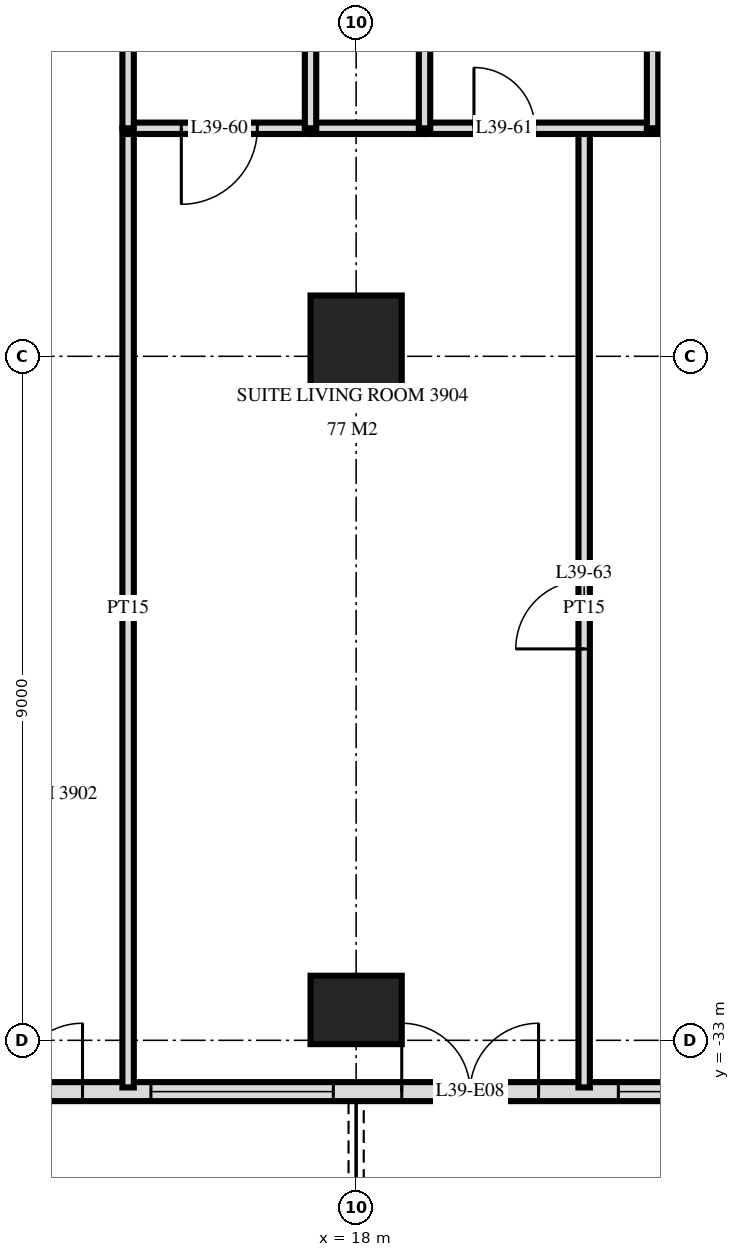
"""IFC4 building model, lengths in metres.
Left out: names, types, materials, properties, quantities, classifications, styles, units other than length and angle.
Written with IfcOpenShell. Run it as: python <this file> out.ifc"""

import sys

from ifc_helpers import new_model, si_unit, direction, frame, frame_2d, origin, origin_2d, place, context, subcontext, project, spatial, rectangle, extrude, element, fill, save


model = new_model("IFC4")
c1 = context("Model", 3, precision=1e-05, world=origin(), true_north=direction((0.0, 1.0)))
c2 = subcontext(c1, "Body", "Model", "MODEL_VIEW")
j1 = project(units=[si_unit("LENGTHUNIT", "METRE"), si_unit("PLANEANGLEUNIT", "RADIAN")], contexts=[c1])
p1 = place(None, origin())
s1 = spatial("IfcSite", under=j1, at=p1, CompositionType="ELEMENT")
p2 = place(p1, origin())
s2 = spatial("IfcBuilding", under=s1, at=p2, CompositionType="ELEMENT")
p3 = place(p2, frame((0.0, 0.0, 152.4)))
s3 = spatial("IfcBuildingStorey", under=s2, at=p3, CompositionType="ELEMENT", Elevation=152.4)
p4 = place(p3, frame((18.0, -32.6, 0.0), z_axis=(0.0, 0.0, 1.0), x_axis=(1.0, 0.0, 0.0)))
e1 = element("IfcColumn", 1, at=p4, inside=s3, PredefinedType="COLUMN", context=c2, shape_type="SweptSolid", body=[
    extrude(rectangle(XDim=1.2, YDim=0.9, at=origin_2d()), origin(), (0.0, 0.0, 1.0), 3.6),
])
p5 = place(p3, frame((18.0, -23.8, 0.0), z_axis=(0.0, 0.0, 1.0), x_axis=(1.0, 0.0, 0.0)))
e2 = element("IfcColumn", 2, at=p5, inside=s3, PredefinedType="COLUMN", context=c2, shape_type="SweptSolid", body=[
    extrude(rectangle(XDim=1.2, YDim=1.2, at=origin_2d()), origin(), (0.0, 0.0, 1.0), 3.6),
])
p6 = place(p3, frame((-23.675, -33.675, 0.0), z_axis=(0.0, 0.0, 1.0), x_axis=(1.0, 0.0, 0.0)))
e3 = element("IfcWall", 3, at=p6, inside=s3, PredefinedType="SOLIDWALL", context=c2, shape_type="SweptSolid", body=[
    extrude(rectangle(XDim=47.351, YDim=0.25, at=frame_2d((23.675, 0.0))), origin(), (0.0, 0.0, 1.0), 3.32),
])
p7 = place(p6, frame((3.425, 0.0, 0.0)))
e4 = element("IfcOpeningElement", 4, at=p7, cuts=e3, PredefinedType="OPENING", context=c2, shape_type="SweptSolid", body=[
    extrude(rectangle(XDim=1.8, YDim=2.4, at=frame_2d((0.9, 1.2))), frame((0.0, 0.135, 0.0), z_axis=(0.0, -1.0, 0.0), x_axis=(1.0, 0.0, 0.0)), (0.0, 0.0, 1.0), 0.27),
])
p8 = place(p6, frame((6.275, 0.0, 0.0)))
e5 = element("IfcOpeningElement", 5, at=p8, cuts=e3, PredefinedType="OPENING", context=c2, shape_type="SweptSolid", body=[
    extrude(rectangle(XDim=1.8, YDim=2.4, at=frame_2d((0.9, 1.2))), frame((0.0, 0.135, 0.0), z_axis=(0.0, -1.0, 0.0), x_axis=(1.0, 0.0, 0.0)), (0.0, 0.0, 1.0), 0.27),
])
p9 = place(p6, frame((8.975, 0.0, 0.3)))
e6 = element("IfcOpeningElement", 6, at=p9, cuts=e3, PredefinedType="OPENING", context=c2, shape_type="SweptSolid", body=[
    extrude(rectangle(XDim=2.4, YDim=2.1, at=frame_2d((1.2, 1.05))), frame((0.0, 0.135, 0.0), z_axis=(0.0, -1.0, 0.0), x_axis=(1.0, 0.0, 0.0)), (0.0, 0.0, 1.0), 0.27),
])
p10 = place(p6, frame((12.275, 0.0, 0.0)))
e7 = element("IfcOpeningElement", 7, at=p10, cuts=e3, PredefinedType="OPENING", context=c2, shape_type="SweptSolid", body=[
    extrude(rectangle(XDim=1.8, YDim=2.4, at=frame_2d((0.9, 1.2))), frame((0.0, 0.135, 0.0), z_axis=(0.0, -1.0, 0.0), x_axis=(1.0, 0.0, 0.0)), (0.0, 0.0, 1.0), 0.27),
])
p11 = place(p6, frame((14.975, 0.0, 0.3)))
e8 = element("IfcOpeningElement", 8, at=p11, cuts=e3, PredefinedType="OPENING", context=c2, shape_type="SweptSolid", body=[
    extrude(rectangle(XDim=2.4, YDim=2.1, at=frame_2d((1.2, 1.05))), frame((0.0, 0.135, 0.0), z_axis=(0.0, -1.0, 0.0), x_axis=(1.0, 0.0, 0.0)), (0.0, 0.0, 1.0), 0.27),
])
p12 = place(p6, frame((21.275, 0.0, 0.0)))
e9 = element("IfcOpeningElement", 9, at=p12, cuts=e3, PredefinedType="OPENING", context=c2, shape_type="SweptSolid", body=[
    extrude(rectangle(XDim=1.8, YDim=2.4, at=frame_2d((0.9, 1.2))), frame((0.0, 0.135, 0.0), z_axis=(0.0, -1.0, 0.0), x_axis=(1.0, 0.0, 0.0)), (0.0, 0.0, 1.0), 0.27),
])
p13 = place(p6, frame((24.275, 0.0, 0.0)))
e10 = element("IfcOpeningElement", 10, at=p13, cuts=e3, PredefinedType="OPENING", context=c2, shape_type="SweptSolid", body=[
    extrude(rectangle(XDim=1.8, YDim=2.4, at=frame_2d((0.9, 1.2))), frame((0.0, 0.135, 0.0), z_axis=(0.0, -1.0, 0.0), x_axis=(1.0, 0.0, 0.0)), (0.0, 0.0, 1.0), 0.27),
])
p14 = place(p6, frame((30.275, 0.0, 0.0)))
e11 = element("IfcOpeningElement", 11, at=p14, cuts=e3, PredefinedType="OPENING", context=c2, shape_type="SweptSolid", body=[
    extrude(rectangle(XDim=1.8, YDim=2.4, at=frame_2d((0.9, 1.2))), frame((0.0, 0.135, 0.0), z_axis=(0.0, -1.0, 0.0), x_axis=(1.0, 0.0, 0.0)), (0.0, 0.0, 1.0), 0.27),
])
p15 = place(p6, frame((32.975, 0.0, 0.3)))
e12 = element("IfcOpeningElement", 12, at=p15, cuts=e3, PredefinedType="OPENING", context=c2, shape_type="SweptSolid", body=[
    extrude(rectangle(XDim=2.4, YDim=2.1, at=frame_2d((1.2, 1.05))), frame((0.0, 0.135, 0.0), z_axis=(0.0, -1.0, 0.0), x_axis=(1.0, 0.0, 0.0)), (0.0, 0.0, 1.0), 0.27),
])
p16 = place(p6, frame((36.275, 0.0, 0.0)))
e13 = element("IfcOpeningElement", 13, at=p16, cuts=e3, PredefinedType="OPENING", context=c2, shape_type="SweptSolid", body=[
    extrude(rectangle(XDim=1.8, YDim=2.4, at=frame_2d((0.9, 1.2))), frame((0.0, 0.135, 0.0), z_axis=(0.0, -1.0, 0.0), x_axis=(1.0, 0.0, 0.0)), (0.0, 0.0, 1.0), 0.27),
])
p17 = place(p6, frame((38.975, 0.0, 0.3)))
e14 = element("IfcOpeningElement", 14, at=p17, cuts=e3, PredefinedType="OPENING", context=c2, shape_type="SweptSolid", body=[
    extrude(rectangle(XDim=2.4, YDim=2.1, at=frame_2d((1.2, 1.05))), frame((0.0, 0.135, 0.0), z_axis=(0.0, -1.0, 0.0), x_axis=(1.0, 0.0, 0.0)), (0.0, 0.0, 1.0), 0.27),
])
p18 = place(p6, frame((42.275, 0.0, 0.0)))
e15 = element("IfcOpeningElement", 15, at=p18, cuts=e3, PredefinedType="OPENING", context=c2, shape_type="SweptSolid", body=[
    extrude(rectangle(XDim=1.8, YDim=2.4, at=frame_2d((0.9, 1.2))), frame((0.0, 0.135, 0.0), z_axis=(0.0, -1.0, 0.0), x_axis=(1.0, 0.0, 0.0)), (0.0, 0.0, 1.0), 0.27),
])
p19 = place(p6, frame((45.125, 0.0, 0.3)))
e16 = element("IfcOpeningElement", 16, at=p19, cuts=e3, PredefinedType="OPENING", context=c2, shape_type="SweptSolid", body=[
    extrude(rectangle(XDim=1.8, YDim=2.1, at=frame_2d((0.9, 1.05))), frame((0.0, 0.135, 0.0), z_axis=(0.0, -1.0, 0.0), x_axis=(1.0, 0.0, 0.0)), (0.0, 0.0, 1.0), 0.27),
])
p20 = place(p3, frame((21.9, -21.0, 0.0), z_axis=(0.0, 0.0, 1.0), x_axis=(0.0, 1.0, 0.0)))
e17 = element("IfcWall", 17, at=p20, inside=s3, PredefinedType="PARTITIONING", context=c2, shape_type="SweptSolid", body=[
    extrude(rectangle(XDim=4.2, YDim=0.15, at=frame_2d((2.1, 0.0))), origin(), (0.0, 0.0, 1.0), 3.32),
])
p21 = place(p3, frame((21.0, -33.62, 0.0), z_axis=(0.0, 0.0, 1.0), x_axis=(0.0, 1.0, 0.0)))
e18 = element("IfcWall", 18, at=p21, inside=s3, PredefinedType="PARTITIONING", context=c2, shape_type="SweptSolid", body=[
    extrude(rectangle(XDim=12.62, YDim=0.15, at=frame_2d((6.31, 0.0))), origin(), (0.0, 0.0, 1.0), 3.32),
])
p22 = place(p21, frame((5.77, 0.0, 0.0)))
e19 = element("IfcOpeningElement", 19, at=p22, cuts=e18, PredefinedType="OPENING", context=c2, shape_type="SweptSolid", body=[
    extrude(rectangle(XDim=0.9, YDim=2.1, at=frame_2d((0.45, 1.05))), frame((0.0, 0.085, 0.0), z_axis=(0.0, -1.0, 0.0), x_axis=(1.0, 0.0, 0.0)), (0.0, 0.0, 1.0), 0.17),
])
p23 = place(p3, frame((18.9, -21.0, 0.0), z_axis=(0.0, 0.0, 1.0), x_axis=(0.0, 1.0, 0.0)))
e20 = element("IfcWall", 20, at=p23, inside=s3, PredefinedType="PLUMBINGWALL", context=c2, shape_type="SweptSolid", body=[
    extrude(rectangle(XDim=4.2, YDim=0.15, at=frame_2d((2.1, 0.0))), origin(), (0.0, 0.0, 1.0), 3.32),
])
p24 = place(p3, frame((17.4, -21.0, 0.0), z_axis=(0.0, 0.0, 1.0), x_axis=(0.0, 1.0, 0.0)))
e21 = element("IfcWall", 21, at=p24, inside=s3, PredefinedType="PARTITIONING", context=c2, shape_type="SweptSolid", body=[
    extrude(rectangle(XDim=4.2, YDim=0.15, at=frame_2d((2.1, 0.0))), origin(), (0.0, 0.0, 1.0), 3.32),
])
p25 = place(p24, frame((1.6, 0.0, 0.0)))
e22 = element("IfcOpeningElement", 22, at=p25, cuts=e21, PredefinedType="OPENING", context=c2, shape_type="SweptSolid", body=[
    extrude(rectangle(XDim=1.0, YDim=2.1, at=frame_2d((0.5, 1.05))), frame((0.0, 0.085, 0.0), z_axis=(0.0, -1.0, 0.0), x_axis=(1.0, 0.0, 0.0)), (0.0, 0.0, 1.0), 0.17),
])
p26 = place(p3, frame((15.0, -21.0, 0.0), z_axis=(0.0, 0.0, 1.0), x_axis=(0.0, 1.0, 0.0)))
e23 = element("IfcWall", 23, at=p26, inside=s3, PredefinedType="PARTITIONING", context=c2, shape_type="SweptSolid", body=[
    extrude(rectangle(XDim=4.2, YDim=0.15, at=frame_2d((2.1, 0.0))), origin(), (0.0, 0.0, 1.0), 3.32),
])
p27 = place(p3, frame((15.0, -33.62, 0.0), z_axis=(0.0, 0.0, 1.0), x_axis=(0.0, 1.0, 0.0)))
e24 = element("IfcWall", 24, at=p27, inside=s3, PredefinedType="PARTITIONING", context=c2, shape_type="SweptSolid", body=[
    extrude(rectangle(XDim=12.62, YDim=0.15, at=frame_2d((6.31, 0.0))), origin(), (0.0, 0.0, 1.0), 3.32),
])
p28 = place(p3, frame((15.0, -21.0, 0.0), z_axis=(0.0, 0.0, 1.0), x_axis=(1.0, 0.0, 0.0)))
e25 = element("IfcWall", 25, at=p28, inside=s3, PredefinedType="PARTITIONING", context=c2, shape_type="SweptSolid", body=[
    extrude(rectangle(XDim=2.4, YDim=0.15, at=frame_2d((1.2, 0.0))), origin(), (0.0, 0.0, 1.0), 3.32),
])
p29 = place(p28, frame((0.7, 0.0, 0.0)))
e26 = element("IfcOpeningElement", 26, at=p29, cuts=e25, PredefinedType="OPENING", context=c2, shape_type="SweptSolid", body=[
    extrude(rectangle(XDim=1.0, YDim=2.1, at=frame_2d((0.5, 1.05))), frame((0.0, 0.085, 0.0), z_axis=(0.0, -1.0, 0.0), x_axis=(1.0, 0.0, 0.0)), (0.0, 0.0, 1.0), 0.17),
])
p30 = place(p3, frame((18.9, -21.0, 0.0), z_axis=(0.0, 0.0, 1.0), x_axis=(1.0, 0.0, 0.0)))
e27 = element("IfcWall", 27, at=p30, inside=s3, PredefinedType="PARTITIONING", context=c2, shape_type="SweptSolid", body=[
    extrude(rectangle(XDim=9.12, YDim=0.15, at=frame_2d((4.56, 0.0))), origin(), (0.0, 0.0, 1.0), 3.32),
])
p31 = place(p30, frame((0.65, 0.0, 0.0)))
e28 = element("IfcOpeningElement", 28, at=p31, cuts=e27, PredefinedType="OPENING", context=c2, shape_type="SweptSolid", body=[
    extrude(rectangle(XDim=0.8, YDim=2.1, at=frame_2d((0.4, 1.05))), frame((0.0, 0.085, 0.0), z_axis=(0.0, -1.0, 0.0), x_axis=(1.0, 0.0, 0.0)), (0.0, 0.0, 1.0), 0.17),
])
p32 = place(p30, frame((5.7, 0.0, 0.0)))
e29 = element("IfcOpeningElement", 29, at=p32, cuts=e27, PredefinedType="OPENING", context=c2, shape_type="SweptSolid", body=[
    extrude(rectangle(XDim=0.9, YDim=2.1, at=frame_2d((0.45, 1.05))), frame((0.0, 0.085, 0.0), z_axis=(0.0, -1.0, 0.0), x_axis=(1.0, 0.0, 0.0)), (0.0, 0.0, 1.0), 0.17),
])
p33 = place(p3, frame((17.4, -21.0, 0.0), z_axis=(0.0, 0.0, 1.0), x_axis=(1.0, 0.0, 0.0)))
e30 = element("IfcWall", 30, at=p33, inside=s3, PredefinedType="PLUMBINGWALL", context=c2, shape_type="SweptSolid", body=[
    extrude(rectangle(XDim=1.5, YDim=0.15, at=frame_2d((0.75, 0.0))), origin(), (0.0, 0.0, 1.0), 3.32),
])
p34 = place(p16, origin())
e31 = element("IfcDoor", 31, at=p34, inside=s3, OperationType="DOUBLE_DOOR_SINGLE_SWING", PredefinedType="DOOR", context=c2, shape_type="SweptSolid", body=[
    extrude(rectangle(XDim=1.8, YDim=2.4, at=frame_2d((0.9, 1.2))), frame((0.0, 0.025, 0.0), z_axis=(0.0, -1.0, 0.0), x_axis=(1.0, 0.0, 0.0)), (0.0, 0.0, 1.0), 0.05),
])
fill(e13, e31)
p35 = place(p17, origin())
e32 = element("IfcWindow", 32, at=p35, inside=s3, PartitioningType="SINGLE_PANEL", PredefinedType="WINDOW", context=c2, shape_type="SweptSolid", body=[
    extrude(rectangle(XDim=2.4, YDim=2.1, at=frame_2d((1.2, 1.05))), frame((0.0, 0.03, 0.0), z_axis=(0.0, -1.0, 0.0), x_axis=(1.0, 0.0, 0.0)), (0.0, 0.0, 1.0), 0.06),
])
fill(e14, e32)
p36 = place(p18, origin())
e33 = element("IfcDoor", 33, at=p36, inside=s3, OperationType="DOUBLE_DOOR_SINGLE_SWING", PredefinedType="DOOR", context=c2, shape_type="SweptSolid", body=[
    extrude(rectangle(XDim=1.8, YDim=2.4, at=frame_2d((0.9, 1.2))), frame((0.0, 0.025, 0.0), z_axis=(0.0, -1.0, 0.0), x_axis=(1.0, 0.0, 0.0)), (0.0, 0.0, 1.0), 0.05),
])
fill(e15, e33)
p37 = place(p19, origin())
e34 = element("IfcWindow", 34, at=p37, inside=s3, PartitioningType="SINGLE_PANEL", PredefinedType="WINDOW", context=c2, shape_type="SweptSolid", body=[
    extrude(rectangle(XDim=1.8, YDim=2.1, at=frame_2d((0.9, 1.05))), frame((0.0, 0.03, 0.0), z_axis=(0.0, -1.0, 0.0), x_axis=(1.0, 0.0, 0.0)), (0.0, 0.0, 1.0), 0.06),
])
fill(e16, e34)
p38 = place(p29, frame((0.5, 0.0, 0.0), z_axis=(0.0, 0.0, 1.0), x_axis=(-1.0, 0.0, 0.0)))
e35 = element("IfcDoor", 35, at=p38, inside=s3, OperationType="SINGLE_SWING_LEFT", PredefinedType="DOOR", context=c2, shape_type="SweptSolid", body=[
    extrude(rectangle(XDim=1.0, YDim=2.1, at=frame_2d((0.0, 1.05))), frame((0.0, -0.025, 0.0), z_axis=(0.0, 1.0, 0.0), x_axis=(-1.0, 0.0, 0.0)), (0.0, 0.0, 1.0), 0.05),
])
fill(e26, e35)
p39 = place(p31, origin())
e36 = element("IfcDoor", 36, at=p39, inside=s3, OperationType="SINGLE_SWING_RIGHT", PredefinedType="DOOR", context=c2, shape_type="SweptSolid", body=[
    extrude(rectangle(XDim=0.8, YDim=2.1, at=frame_2d((0.4, 1.05))), frame((0.0, 0.025, 0.0), z_axis=(0.0, -1.0, 0.0), x_axis=(1.0, 0.0, 0.0)), (0.0, 0.0, 1.0), 0.05),
])
fill(e28, e36)
p40 = place(p22, origin())
e37 = element("IfcDoor", 37, at=p40, inside=s3, OperationType="SINGLE_SWING_RIGHT", PredefinedType="DOOR", context=c2, shape_type="SweptSolid", body=[
    extrude(rectangle(XDim=0.9, YDim=2.1, at=frame_2d((0.45, 1.05))), frame((0.0, 0.025, 0.0), z_axis=(0.0, -1.0, 0.0), x_axis=(1.0, 0.0, 0.0)), (0.0, 0.0, 1.0), 0.05),
])
fill(e19, e37)
save(model, sys.argv[1])
